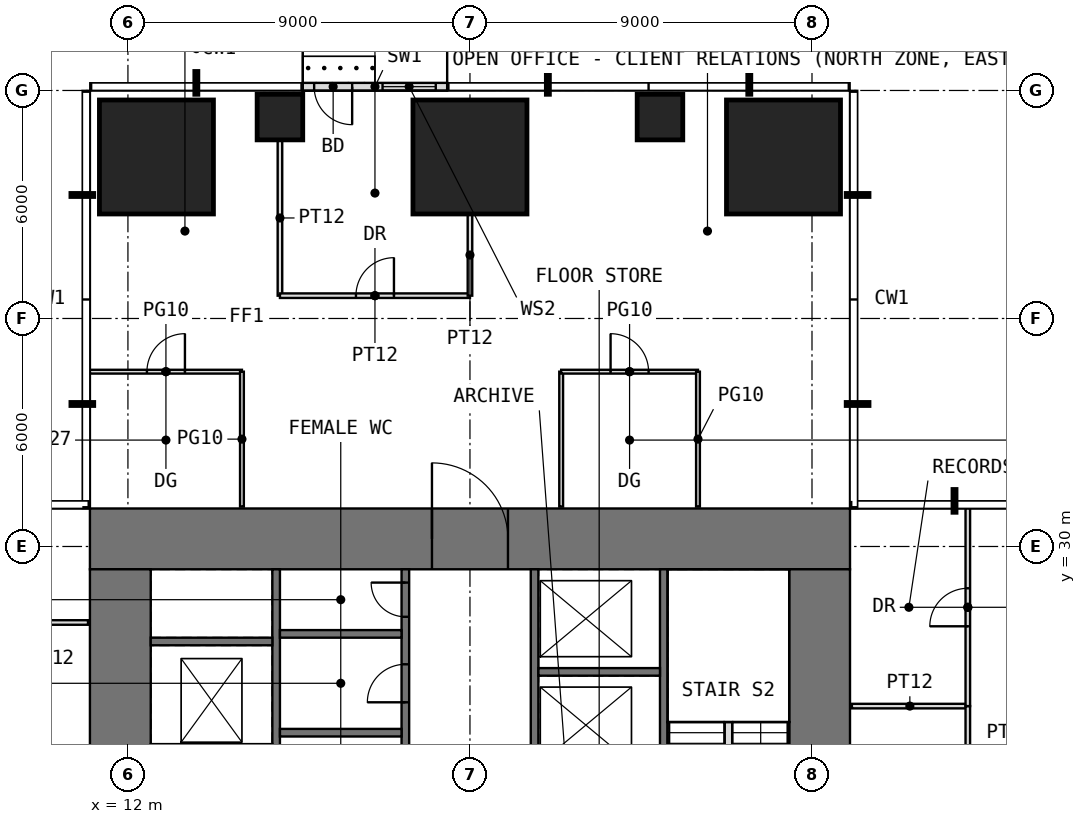
"""IFC4 building model, lengths in metres.
Left out: names, types, materials, properties, quantities, classifications, styles, units other than length and angle.
Written with IfcOpenShell. Run it as: python <this file> out.ifc"""

import sys

from ifc_helpers import new_model, si_unit, direction, frame, frame_2d, origin, origin_2d, place, context, subcontext, project, spatial, rectangle, extrude, element, fill, save


model = new_model("IFC4")
c1 = context("Model", 3, precision=1e-05, world=origin(), true_north=direction((0.0, 1.0)))
c2 = subcontext(c1, "Body", "Model", "MODEL_VIEW")
j1 = project(units=[si_unit("LENGTHUNIT", "METRE"), si_unit("PLANEANGLEUNIT", "RADIAN")], contexts=[c1])
p1 = place(None, origin())
s1 = spatial("IfcSite", under=j1, at=p1, CompositionType="ELEMENT")
p2 = place(p1, origin())
s2 = spatial("IfcBuilding", under=s1, at=p2, CompositionType="ELEMENT")
p3 = place(p2, frame((0.0, 0.0, 100.5)))
s3 = spatial("IfcBuildingStorey", under=s2, at=p3, CompositionType="ELEMENT", Elevation=100.5)
p4 = place(p3, frame((12.75, 40.25, 0.0), z_axis=(0.0, 0.0, 1.0), x_axis=(1.0, 0.0, 0.0)))
e1 = element("IfcColumn", 1, at=p4, inside=s3, PredefinedType="COLUMN", context=c2, shape_type="SweptSolid", body=[
    extrude(rectangle(XDim=3.0, YDim=3.0, at=origin_2d()), origin(), (0.0, 0.0, 1.0), 4.0),
])
p5 = place(p3, frame((16.0, 41.3, 0.0), z_axis=(0.0, 0.0, 1.0), x_axis=(1.0, 0.0, 0.0)))
e2 = element("IfcColumn", 2, at=p5, inside=s3, PredefinedType="COLUMN", context=c2, shape_type="SweptSolid", body=[
    extrude(rectangle(XDim=1.2, YDim=1.2, at=origin_2d()), origin(), (0.0, 0.0, 1.0), 4.0),
])
p6 = place(p3, frame((21.0, 40.25, 0.0), z_axis=(0.0, 0.0, 1.0), x_axis=(1.0, 0.0, 0.0)))
e3 = element("IfcColumn", 3, at=p6, inside=s3, PredefinedType="COLUMN", context=c2, shape_type="SweptSolid", body=[
    extrude(rectangle(XDim=3.0, YDim=3.0, at=origin_2d()), origin(), (0.0, 0.0, 1.0), 4.0),
])
p7 = place(p3, frame((26.0, 41.3, 0.0), z_axis=(0.0, 0.0, 1.0), x_axis=(1.0, 0.0, 0.0)))
e4 = element("IfcColumn", 4, at=p7, inside=s3, PredefinedType="COLUMN", context=c2, shape_type="SweptSolid", body=[
    extrude(rectangle(XDim=1.2, YDim=1.2, at=origin_2d()), origin(), (0.0, 0.0, 1.0), 4.0),
])
p8 = place(p3, frame((29.25, 40.25, 0.0), z_axis=(0.0, 0.0, 1.0), x_axis=(1.0, 0.0, 0.0)))
e5 = element("IfcColumn", 5, at=p8, inside=s3, PredefinedType="COLUMN", context=c2, shape_type="SweptSolid", body=[
    extrude(rectangle(XDim=3.0, YDim=3.0, at=origin_2d()), origin(), (0.0, 0.0, 1.0), 4.0),
])
p9 = place(p3, frame((20.4, 42.1, 0.0), z_axis=(0.0, 0.0, 1.0), x_axis=(-1.0, 0.0, 0.0)))
e6 = element("IfcWall", 6, at=p9, inside=s3, PredefinedType="USERDEFINED", context=c2, shape_type="SweptSolid", body=[
    extrude(rectangle(XDim=3.8, YDim=0.2, at=frame_2d((1.9, 0.0))), origin(), (0.0, 0.0, 1.0), 3.75),
])
p10 = place(p9, frame((2.5, 0.0, 0.0)))
e7 = element("IfcOpeningElement", 7, at=p10, cuts=e6, PredefinedType="OPENING", context=c2, shape_type="SweptSolid", body=[
    extrude(rectangle(XDim=1.0, YDim=2.4, at=frame_2d((0.5, 1.2))), frame((0.0, 0.11, 0.0), z_axis=(0.0, -1.0, 0.0), x_axis=(1.0, 0.0, 0.0)), (0.0, 0.0, 1.0), 0.22),
])
p11 = place(p9, frame((0.3, 0.0, 0.3)))
e8 = element("IfcOpeningElement", 8, at=p11, cuts=e6, PredefinedType="OPENING", context=c2, shape_type="SweptSolid", body=[
    extrude(rectangle(XDim=1.4, YDim=2.7, at=frame_2d((0.7, 1.35))), frame((0.0, 0.11, 0.0), z_axis=(0.0, -1.0, 0.0), x_axis=(1.0, 0.0, 0.0)), (0.0, 0.0, 1.0), 0.22),
])
p12 = place(p3, frame((11.0, 30.2, -0.05), z_axis=(0.0, 0.0, 1.0), x_axis=(1.0, 0.0, 0.0)))
e9 = element("IfcWall", 9, at=p12, inside=s3, PredefinedType="SHEAR", context=c2, shape_type="SweptSolid", body=[
    extrude(rectangle(XDim=20.0, YDim=1.6, at=frame_2d((10.0, 0.0))), origin(), (0.0, 0.0, 1.0), 4.0),
])
p13 = place(p12, frame((9.0, 0.0, 0.05)))
e10 = element("IfcOpeningElement", 10, at=p13, cuts=e9, PredefinedType="OPENING", context=c2, shape_type="SweptSolid", body=[
    extrude(rectangle(XDim=2.0, YDim=2.2, at=frame_2d((1.0, 1.1))), frame((0.0, 0.81, 0.0), z_axis=(0.0, -1.0, 0.0), x_axis=(1.0, 0.0, 0.0)), (0.0, 0.0, 1.0), 1.62),
])
p14 = place(p3, frame((11.8, 12.6, -0.05), z_axis=(0.0, 0.0, 1.0), x_axis=(0.0, 1.0, 0.0)))
e11 = element("IfcWall", 11, at=p14, inside=s3, PredefinedType="SHEAR", context=c2, shape_type="SweptSolid", body=[
    extrude(rectangle(XDim=16.8, YDim=1.6, at=frame_2d((8.4, 0.0))), origin(), (0.0, 0.0, 1.0), 4.0),
])
p15 = place(p14, frame((9.9, 0.0, 0.05)))
e12 = element("IfcOpeningElement", 12, at=p15, cuts=e11, PredefinedType="OPENING", context=c2, shape_type="SweptSolid", body=[
    extrude(rectangle(XDim=1.0, YDim=2.2, at=frame_2d((0.5, 1.1))), frame((0.0, 0.81, 0.0), z_axis=(0.0, -1.0, 0.0), x_axis=(1.0, 0.0, 0.0)), (0.0, 0.0, 1.0), 1.62),
])
p16 = place(p3, frame((30.2, 12.6, -0.05), z_axis=(0.0, 0.0, 1.0), x_axis=(0.0, 1.0, 0.0)))
e13 = element("IfcWall", 13, at=p16, inside=s3, PredefinedType="SHEAR", context=c2, shape_type="SweptSolid", body=[
    extrude(rectangle(XDim=16.8, YDim=1.6, at=frame_2d((8.4, 0.0))), origin(), (0.0, 0.0, 1.0), 4.0),
])
p17 = place(p16, frame((5.9, 0.0, 0.05)))
e14 = element("IfcOpeningElement", 14, at=p17, cuts=e13, PredefinedType="OPENING", context=c2, shape_type="SweptSolid", body=[
    extrude(rectangle(XDim=1.0, YDim=2.2, at=frame_2d((0.5, 1.1))), frame((0.0, 0.81, 0.0), z_axis=(0.0, -1.0, 0.0), x_axis=(1.0, 0.0, 0.0)), (0.0, 0.0, 1.0), 1.62),
])
p18 = place(p3, frame((15.9, 12.6, -0.05), z_axis=(0.0, 0.0, 1.0), x_axis=(0.0, 1.0, 0.0)))
e15 = element("IfcWall", 15, at=p18, inside=s3, PredefinedType="SHEAR", context=c2, shape_type="SweptSolid", body=[
    extrude(rectangle(XDim=16.8, YDim=0.2, at=frame_2d((8.4, 0.0))), origin(), (0.0, 0.0, 1.0), 4.0),
])
p19 = place(p18, frame((8.9, 0.0, 0.05)))
e16 = element("IfcOpeningElement", 16, at=p19, cuts=e15, PredefinedType="OPENING", context=c2, shape_type="SweptSolid", body=[
    extrude(rectangle(XDim=1.0, YDim=2.2, at=frame_2d((0.5, 1.1))), frame((0.0, 0.11, 0.0), z_axis=(0.0, -1.0, 0.0), x_axis=(1.0, 0.0, 0.0)), (0.0, 0.0, 1.0), 0.22),
])
p20 = place(p3, frame((19.3, 12.6, -0.05), z_axis=(0.0, 0.0, 1.0), x_axis=(0.0, 1.0, 0.0)))
e17 = element("IfcWall", 17, at=p20, inside=s3, PredefinedType="SHEAR", context=c2, shape_type="SweptSolid", body=[
    extrude(rectangle(XDim=16.8, YDim=0.2, at=frame_2d((8.4, 0.0))), origin(), (0.0, 0.0, 1.0), 4.0),
])
p21 = place(p20, frame((8.7, 0.0, 0.05)))
e18 = element("IfcOpeningElement", 18, at=p21, cuts=e17, PredefinedType="OPENING", context=c2, shape_type="SweptSolid", body=[
    extrude(rectangle(XDim=1.0, YDim=2.2, at=frame_2d((0.5, 1.1))), frame((0.0, 0.11, 0.0), z_axis=(0.0, -1.0, 0.0), x_axis=(1.0, 0.0, 0.0)), (0.0, 0.0, 1.0), 0.22),
])
p22 = place(p20, frame((10.85, 0.0, 0.05)))
e19 = element("IfcOpeningElement", 19, at=p22, cuts=e17, PredefinedType="OPENING", context=c2, shape_type="SweptSolid", body=[
    extrude(rectangle(XDim=0.9, YDim=2.2, at=frame_2d((0.45, 1.1))), frame((0.0, 0.11, 0.0), z_axis=(0.0, -1.0, 0.0), x_axis=(1.0, 0.0, 0.0)), (0.0, 0.0, 1.0), 0.22),
])
p23 = place(p20, frame((13.3, 0.0, 0.05)))
e20 = element("IfcOpeningElement", 20, at=p23, cuts=e17, PredefinedType="OPENING", context=c2, shape_type="SweptSolid", body=[
    extrude(rectangle(XDim=1.0, YDim=2.2, at=frame_2d((0.5, 1.1))), frame((0.0, 0.11, 0.0), z_axis=(0.0, -1.0, 0.0), x_axis=(1.0, 0.0, 0.0)), (0.0, 0.0, 1.0), 0.22),
])
p24 = place(p20, frame((15.55, 0.0, 0.05)))
e21 = element("IfcOpeningElement", 21, at=p24, cuts=e17, PredefinedType="OPENING", context=c2, shape_type="SweptSolid", body=[
    extrude(rectangle(XDim=0.9, YDim=2.2, at=frame_2d((0.45, 1.1))), frame((0.0, 0.11, 0.0), z_axis=(0.0, -1.0, 0.0), x_axis=(1.0, 0.0, 0.0)), (0.0, 0.0, 1.0), 0.22),
])
p25 = place(p20, frame((0.75, 0.0, 0.05)))
e22 = element("IfcOpeningElement", 22, at=p25, cuts=e17, PredefinedType="OPENING", context=c2, shape_type="SweptSolid", body=[
    extrude(rectangle(XDim=1.1, YDim=2.2, at=frame_2d((0.55, 1.1))), frame((0.0, 0.11, 0.0), z_axis=(0.0, -1.0, 0.0), x_axis=(1.0, 0.0, 0.0)), (0.0, 0.0, 1.0), 0.22),
])
p26 = place(p20, frame((3.55, 0.0, 0.05)))
e23 = element("IfcOpeningElement", 23, at=p26, cuts=e17, PredefinedType="OPENING", context=c2, shape_type="SweptSolid", body=[
    extrude(rectangle(XDim=1.1, YDim=2.2, at=frame_2d((0.55, 1.1))), frame((0.0, 0.11, 0.0), z_axis=(0.0, -1.0, 0.0), x_axis=(1.0, 0.0, 0.0)), (0.0, 0.0, 1.0), 0.22),
])
p27 = place(p20, frame((6.35, 0.0, 0.05)))
e24 = element("IfcOpeningElement", 24, at=p27, cuts=e17, PredefinedType="OPENING", context=c2, shape_type="SweptSolid", body=[
    extrude(rectangle(XDim=1.1, YDim=2.2, at=frame_2d((0.55, 1.1))), frame((0.0, 0.11, 0.0), z_axis=(0.0, -1.0, 0.0), x_axis=(1.0, 0.0, 0.0)), (0.0, 0.0, 1.0), 0.22),
])
p28 = place(p3, frame((22.7, 12.6, -0.05), z_axis=(0.0, 0.0, 1.0), x_axis=(0.0, 1.0, 0.0)))
e25 = element("IfcWall", 25, at=p28, inside=s3, PredefinedType="SHEAR", context=c2, shape_type="SweptSolid", body=[
    extrude(rectangle(XDim=16.8, YDim=0.2, at=frame_2d((8.4, 0.0))), origin(), (0.0, 0.0, 1.0), 4.0),
])
p29 = place(p28, frame((0.45, 0.0, 0.05)))
e26 = element("IfcOpeningElement", 26, at=p29, cuts=e25, PredefinedType="OPENING", context=c2, shape_type="SweptSolid", body=[
    extrude(rectangle(XDim=0.9, YDim=2.2, at=frame_2d((0.45, 1.1))), frame((0.0, 0.11, 0.0), z_axis=(0.0, -1.0, 0.0), x_axis=(1.0, 0.0, 0.0)), (0.0, 0.0, 1.0), 0.22),
])
p30 = place(p28, frame((7.1, 0.0, 0.05)))
e27 = element("IfcOpeningElement", 27, at=p30, cuts=e25, PredefinedType="OPENING", context=c2, shape_type="SweptSolid", body=[
    extrude(rectangle(XDim=1.0, YDim=2.2, at=frame_2d((0.5, 1.1))), frame((0.0, 0.11, 0.0), z_axis=(0.0, -1.0, 0.0), x_axis=(1.0, 0.0, 0.0)), (0.0, 0.0, 1.0), 0.22),
])
p31 = place(p28, frame((1.95, 0.0, 0.05)))
e28 = element("IfcOpeningElement", 28, at=p31, cuts=e25, PredefinedType="OPENING", context=c2, shape_type="SweptSolid", body=[
    extrude(rectangle(XDim=0.9, YDim=2.2, at=frame_2d((0.45, 1.1))), frame((0.0, 0.11, 0.0), z_axis=(0.0, -1.0, 0.0), x_axis=(1.0, 0.0, 0.0)), (0.0, 0.0, 1.0), 0.22),
])
p32 = place(p28, frame((4.95, 0.0, 0.05)))
e29 = element("IfcOpeningElement", 29, at=p32, cuts=e25, PredefinedType="OPENING", context=c2, shape_type="SweptSolid", body=[
    extrude(rectangle(XDim=0.9, YDim=2.2, at=frame_2d((0.45, 1.1))), frame((0.0, 0.11, 0.0), z_axis=(0.0, -1.0, 0.0), x_axis=(1.0, 0.0, 0.0)), (0.0, 0.0, 1.0), 0.22),
])
p33 = place(p28, frame((9.4, 0.0, 0.05)))
e30 = element("IfcOpeningElement", 30, at=p33, cuts=e25, PredefinedType="OPENING", context=c2, shape_type="SweptSolid", body=[
    extrude(rectangle(XDim=1.0, YDim=2.2, at=frame_2d((0.5, 1.1))), frame((0.0, 0.11, 0.0), z_axis=(0.0, -1.0, 0.0), x_axis=(1.0, 0.0, 0.0)), (0.0, 0.0, 1.0), 0.22),
])
p34 = place(p3, frame((26.1, 12.6, -0.05), z_axis=(0.0, 0.0, 1.0), x_axis=(0.0, 1.0, 0.0)))
e31 = element("IfcWall", 31, at=p34, inside=s3, PredefinedType="SHEAR", context=c2, shape_type="SweptSolid", body=[
    extrude(rectangle(XDim=16.8, YDim=0.2, at=frame_2d((8.4, 0.0))), origin(), (0.0, 0.0, 1.0), 4.0),
])
p35 = place(p34, frame((6.9, 0.0, 0.05)))
e32 = element("IfcOpeningElement", 32, at=p35, cuts=e31, PredefinedType="OPENING", context=c2, shape_type="SweptSolid", body=[
    extrude(rectangle(XDim=1.0, YDim=2.2, at=frame_2d((0.5, 1.1))), frame((0.0, 0.11, 0.0), z_axis=(0.0, -1.0, 0.0), x_axis=(1.0, 0.0, 0.0)), (0.0, 0.0, 1.0), 0.22),
])
for number, where, z_axis, x_axis in (
    (33, (12.6, 27.5, -0.05), (0.0, 0.0, 1.0), (1.0, 0.0, 0.0)),
    (34, (16.0, 25.1, -0.05), (0.0, 0.0, 1.0), (1.0, 0.0, 0.0)),
    (35, (16.0, 27.7, -0.05), (0.0, 0.0, 1.0), (1.0, 0.0, 0.0)),
    (36, (22.8, 26.7, -0.05), (0.0, 0.0, 1.0), (1.0, 0.0, 0.0)),
):
    element("IfcWall", number, at=place(p3, frame(where, z_axis=z_axis, x_axis=x_axis)), inside=s3, PredefinedType="SHEAR", context=c2, shape_type="SweptSolid", body=[
        extrude(rectangle(XDim=3.2, YDim=0.2, at=frame_2d((1.6, 0.0))), origin(), (0.0, 0.0, 1.0), 4.0),
    ])
p36 = place(p3, frame((7.9, 28.0, 0.0), z_axis=(0.0, 0.0, 1.0), x_axis=(1.0, 0.0, 0.0)))
e37 = element("IfcWall", 37, at=p36, inside=s3, PredefinedType="PARTITIONING", context=c2, shape_type="SweptSolid", body=[
    extrude(rectangle(XDim=3.05, YDim=0.12, at=frame_2d((1.525, 0.0))), origin(), (0.0, 0.0, 1.0), 3.75),
])
p37 = place(p3, frame((11.0, 34.6, 0.0), z_axis=(0.0, 0.0, 1.0), x_axis=(1.0, 0.0, 0.0)))
e38 = element("IfcWall", 38, at=p37, inside=s3, PredefinedType="PARTITIONING", context=c2, shape_type="SweptSolid", body=[
    extrude(rectangle(XDim=4.0, YDim=0.1, at=frame_2d((2.0, 0.0))), origin(), (0.0, 0.0, 1.0), 3.75),
])
p38 = place(p37, frame((1.5, 0.0, 0.0)))
e39 = element("IfcOpeningElement", 39, at=p38, cuts=e38, PredefinedType="OPENING", context=c2, shape_type="SweptSolid", body=[
    extrude(rectangle(XDim=1.0, YDim=2.4, at=frame_2d((0.5, 1.2))), frame((0.0, 0.06, 0.0), z_axis=(0.0, -1.0, 0.0), x_axis=(1.0, 0.0, 0.0)), (0.0, 0.0, 1.0), 0.12),
])
p39 = place(p3, frame((15.0, 31.05, 0.0), z_axis=(0.0, 0.0, 1.0), x_axis=(0.0, 1.0, 0.0)))
e40 = element("IfcWall", 40, at=p39, inside=s3, PredefinedType="PARTITIONING", context=c2, shape_type="SweptSolid", body=[
    extrude(rectangle(XDim=3.55, YDim=0.1, at=frame_2d((1.775, 0.0))), origin(), (0.0, 0.0, 1.0), 3.75),
])
p40 = place(p3, frame((16.0, 36.6, 0.0), z_axis=(0.0, 0.0, 1.0), x_axis=(0.0, 1.0, 0.0)))
e41 = element("IfcWall", 41, at=p40, inside=s3, PredefinedType="PARTITIONING", context=c2, shape_type="SweptSolid", body=[
    extrude(rectangle(XDim=4.09, YDim=0.12, at=frame_2d((2.045, 0.0))), origin(), (0.0, 0.0, 1.0), 3.75),
])
p41 = place(p3, frame((16.0, 36.6, 0.0), z_axis=(0.0, 0.0, 1.0), x_axis=(1.0, 0.0, 0.0)))
e42 = element("IfcWall", 42, at=p41, inside=s3, PredefinedType="PARTITIONING", context=c2, shape_type="SweptSolid", body=[
    extrude(rectangle(XDim=5.0, YDim=0.12, at=frame_2d((2.5, 0.0))), origin(), (0.0, 0.0, 1.0), 3.75),
])
p42 = place(p41, frame((2.0, 0.0, 0.0)))
e43 = element("IfcOpeningElement", 43, at=p42, cuts=e42, PredefinedType="OPENING", context=c2, shape_type="SweptSolid", body=[
    extrude(rectangle(XDim=1.0, YDim=2.2, at=frame_2d((0.5, 1.1))), frame((0.0, 0.07, 0.0), z_axis=(0.0, -1.0, 0.0), x_axis=(1.0, 0.0, 0.0)), (0.0, 0.0, 1.0), 0.14),
])
p43 = place(p3, frame((21.0, 36.6, 0.0), z_axis=(0.0, 0.0, 1.0), x_axis=(0.0, 1.0, 0.0)))
e44 = element("IfcWall", 44, at=p43, inside=s3, PredefinedType="PARTITIONING", context=c2, shape_type="SweptSolid", body=[
    extrude(rectangle(XDim=2.14, YDim=0.12, at=frame_2d((1.07, 0.0))), origin(), (0.0, 0.0, 1.0), 3.75),
])
p44 = place(p3, frame((23.4, 31.05, 0.0), z_axis=(0.0, 0.0, 1.0), x_axis=(0.0, 1.0, 0.0)))
e45 = element("IfcWall", 45, at=p44, inside=s3, PredefinedType="PARTITIONING", context=c2, shape_type="SweptSolid", body=[
    extrude(rectangle(XDim=3.55, YDim=0.1, at=frame_2d((1.775, 0.0))), origin(), (0.0, 0.0, 1.0), 3.75),
])
p45 = place(p3, frame((23.4, 34.6, 0.0), z_axis=(0.0, 0.0, 1.0), x_axis=(1.0, 0.0, 0.0)))
e46 = element("IfcWall", 46, at=p45, inside=s3, PredefinedType="PARTITIONING", context=c2, shape_type="SweptSolid", body=[
    extrude(rectangle(XDim=3.6, YDim=0.1, at=frame_2d((1.8, 0.0))), origin(), (0.0, 0.0, 1.0), 3.75),
])
p46 = place(p45, frame((1.3, 0.0, 0.0)))
e47 = element("IfcOpeningElement", 47, at=p46, cuts=e46, PredefinedType="OPENING", context=c2, shape_type="SweptSolid", body=[
    extrude(rectangle(XDim=1.0, YDim=2.4, at=frame_2d((0.5, 1.2))), frame((0.0, 0.06, 0.0), z_axis=(0.0, -1.0, 0.0), x_axis=(1.0, 0.0, 0.0)), (0.0, 0.0, 1.0), 0.12),
])
p47 = place(p3, frame((27.0, 31.05, 0.0), z_axis=(0.0, 0.0, 1.0), x_axis=(0.0, 1.0, 0.0)))
e48 = element("IfcWall", 48, at=p47, inside=s3, PredefinedType="PARTITIONING", context=c2, shape_type="SweptSolid", body=[
    extrude(rectangle(XDim=3.55, YDim=0.1, at=frame_2d((1.775, 0.0))), origin(), (0.0, 0.0, 1.0), 3.75),
])
p48 = place(p3, frame((31.05, 25.8, 0.0), z_axis=(0.0, 0.0, 1.0), x_axis=(1.0, 0.0, 0.0)))
e49 = element("IfcWall", 49, at=p48, inside=s3, PredefinedType="PARTITIONING", context=c2, shape_type="SweptSolid", body=[
    extrude(rectangle(XDim=3.05, YDim=0.12, at=frame_2d((1.525, 0.0))), origin(), (0.0, 0.0, 1.0), 3.75),
])
p49 = place(p3, frame((34.1, 20.6, 0.0), z_axis=(0.0, 0.0, 1.0), x_axis=(0.0, 1.0, 0.0)))
e50 = element("IfcWall", 50, at=p49, inside=s3, PredefinedType="PARTITIONING", context=c2, shape_type="SweptSolid", body=[
    extrude(rectangle(XDim=5.2, YDim=0.12, at=frame_2d((2.6, 0.0))), origin(), (0.0, 0.0, 1.0), 3.75),
])
p50 = place(p49, frame((2.1, 0.0, 0.0)))
e51 = element("IfcOpeningElement", 51, at=p50, cuts=e50, PredefinedType="OPENING", context=c2, shape_type="SweptSolid", body=[
    extrude(rectangle(XDim=1.0, YDim=2.2, at=frame_2d((0.5, 1.1))), frame((0.0, 0.07, 0.0), z_axis=(0.0, -1.0, 0.0), x_axis=(1.0, 0.0, 0.0)), (0.0, 0.0, 1.0), 0.14),
])
p51 = place(p3, frame((34.1, 25.8, 0.0), z_axis=(0.0, 0.0, 1.0), x_axis=(0.0, 1.0, 0.0)))
e52 = element("IfcWall", 52, at=p51, inside=s3, PredefinedType="PARTITIONING", context=c2, shape_type="SweptSolid", body=[
    extrude(rectangle(XDim=5.2, YDim=0.12, at=frame_2d((2.6, 0.0))), origin(), (0.0, 0.0, 1.0), 3.75),
])
p52 = place(p51, frame((2.1, 0.0, 0.0)))
e53 = element("IfcOpeningElement", 53, at=p52, cuts=e52, PredefinedType="OPENING", context=c2, shape_type="SweptSolid", body=[
    extrude(rectangle(XDim=1.0, YDim=2.2, at=frame_2d((0.5, 1.1))), frame((0.0, 0.07, 0.0), z_axis=(0.0, -1.0, 0.0), x_axis=(1.0, 0.0, 0.0)), (0.0, 0.0, 1.0), 0.14),
])
p53 = place(p3, frame((27.8, 22.3, 0.0), z_axis=(0.0, 0.0, 1.0), x_axis=(0.0, 1.0, 0.0)))
e54 = element("IfcWall", 54, at=p53, inside=s3, PredefinedType="PARTITIONING", context=c2, shape_type="SweptSolid", body=[
    extrude(rectangle(XDim=3.08, YDim=0.2, at=frame_2d((1.54, 0.0))), origin(), (0.0, 0.0, 1.0), 4.0),
])
p54 = place(p10, origin())
e55 = element("IfcDoor", 55, at=p54, inside=s3, OperationType="SINGLE_SWING_LEFT", PredefinedType="DOOR", context=c2, shape_type="SweptSolid", body=[
    extrude(rectangle(XDim=1.0, YDim=2.4, at=frame_2d((0.5, 1.2))), frame((0.0, 0.025, 0.0), z_axis=(0.0, -1.0, 0.0), x_axis=(1.0, 0.0, 0.0)), (0.0, 0.0, 1.0), 0.05),
])
fill(e7, e55)
p55 = place(p11, origin())
e56 = element("IfcWindow", 56, at=p55, inside=s3, PartitioningType="SINGLE_PANEL", PredefinedType="WINDOW", context=c2, shape_type="SweptSolid", body=[
    extrude(rectangle(XDim=1.4, YDim=2.7, at=frame_2d((0.7, 1.35))), frame((0.0, 0.03, 0.0), z_axis=(0.0, -1.0, 0.0), x_axis=(1.0, 0.0, 0.0)), (0.0, 0.0, 1.0), 0.06),
])
fill(e8, e56)
p56 = place(p13, origin())
e57 = element("IfcDoor", 57, at=p56, inside=s3, OperationType="DOUBLE_DOOR_SINGLE_SWING", PredefinedType="DOOR", context=c2, shape_type="SweptSolid", body=[
    extrude(rectangle(XDim=2.0, YDim=2.2, at=frame_2d((1.0, 1.1))), frame((0.0, 0.025, 0.0), z_axis=(0.0, -1.0, 0.0), x_axis=(1.0, 0.0, 0.0)), (0.0, 0.0, 1.0), 0.05),
])
fill(e10, e57)
p57 = place(p23, origin())
e58 = element("IfcDoor", 58, at=p57, inside=s3, OperationType="SINGLE_SWING_LEFT", PredefinedType="DOOR", context=c2, shape_type="SweptSolid", body=[
    extrude(rectangle(XDim=1.0, YDim=2.2, at=frame_2d((0.5, 1.1))), frame((0.0, 0.025, 0.0), z_axis=(0.0, -1.0, 0.0), x_axis=(1.0, 0.0, 0.0)), (0.0, 0.0, 1.0), 0.05),
])
fill(e20, e58)
p58 = place(p24, origin())
e59 = element("IfcDoor", 59, at=p58, inside=s3, OperationType="SINGLE_SWING_RIGHT", PredefinedType="DOOR", context=c2, shape_type="SweptSolid", body=[
    extrude(rectangle(XDim=0.9, YDim=2.2, at=frame_2d((0.45, 1.1))), frame((0.0, 0.025, 0.0), z_axis=(0.0, -1.0, 0.0), x_axis=(1.0, 0.0, 0.0)), (0.0, 0.0, 1.0), 0.05),
])
fill(e21, e59)
p59 = place(p52, origin())
e60 = element("IfcDoor", 60, at=p59, inside=s3, OperationType="SINGLE_SWING_LEFT", PredefinedType="DOOR", context=c2, shape_type="SweptSolid", body=[
    extrude(rectangle(XDim=1.0, YDim=2.2, at=frame_2d((0.5, 1.1))), frame((0.0, 0.025, 0.0), z_axis=(0.0, -1.0, 0.0), x_axis=(1.0, 0.0, 0.0)), (0.0, 0.0, 1.0), 0.05),
])
fill(e53, e60)
p60 = place(p38, origin())
e61 = element("IfcDoor", 61, at=p60, inside=s3, OperationType="SINGLE_SWING_RIGHT", PredefinedType="DOOR", context=c2, shape_type="SweptSolid", body=[
    extrude(rectangle(XDim=1.0, YDim=2.4, at=frame_2d((0.5, 1.2))), frame((0.0, 0.025, 0.0), z_axis=(0.0, -1.0, 0.0), x_axis=(1.0, 0.0, 0.0)), (0.0, 0.0, 1.0), 0.05),
])
fill(e39, e61)
p61 = place(p46, origin())
e62 = element("IfcDoor", 62, at=p61, inside=s3, OperationType="SINGLE_SWING_LEFT", PredefinedType="DOOR", context=c2, shape_type="SweptSolid", body=[
    extrude(rectangle(XDim=1.0, YDim=2.4, at=frame_2d((0.5, 1.2))), frame((0.0, 0.025, 0.0), z_axis=(0.0, -1.0, 0.0), x_axis=(1.0, 0.0, 0.0)), (0.0, 0.0, 1.0), 0.05),
])
fill(e47, e62)
p62 = place(p42, origin())
e63 = element("IfcDoor", 63, at=p62, inside=s3, OperationType="SINGLE_SWING_RIGHT", PredefinedType="DOOR", context=c2, shape_type="SweptSolid", body=[
    extrude(rectangle(XDim=1.0, YDim=2.2, at=frame_2d((0.5, 1.1))), frame((0.0, 0.025, 0.0), z_axis=(0.0, -1.0, 0.0), x_axis=(1.0, 0.0, 0.0)), (0.0, 0.0, 1.0), 0.05),
])
fill(e43, e63)
save(model, sys.argv[1])
